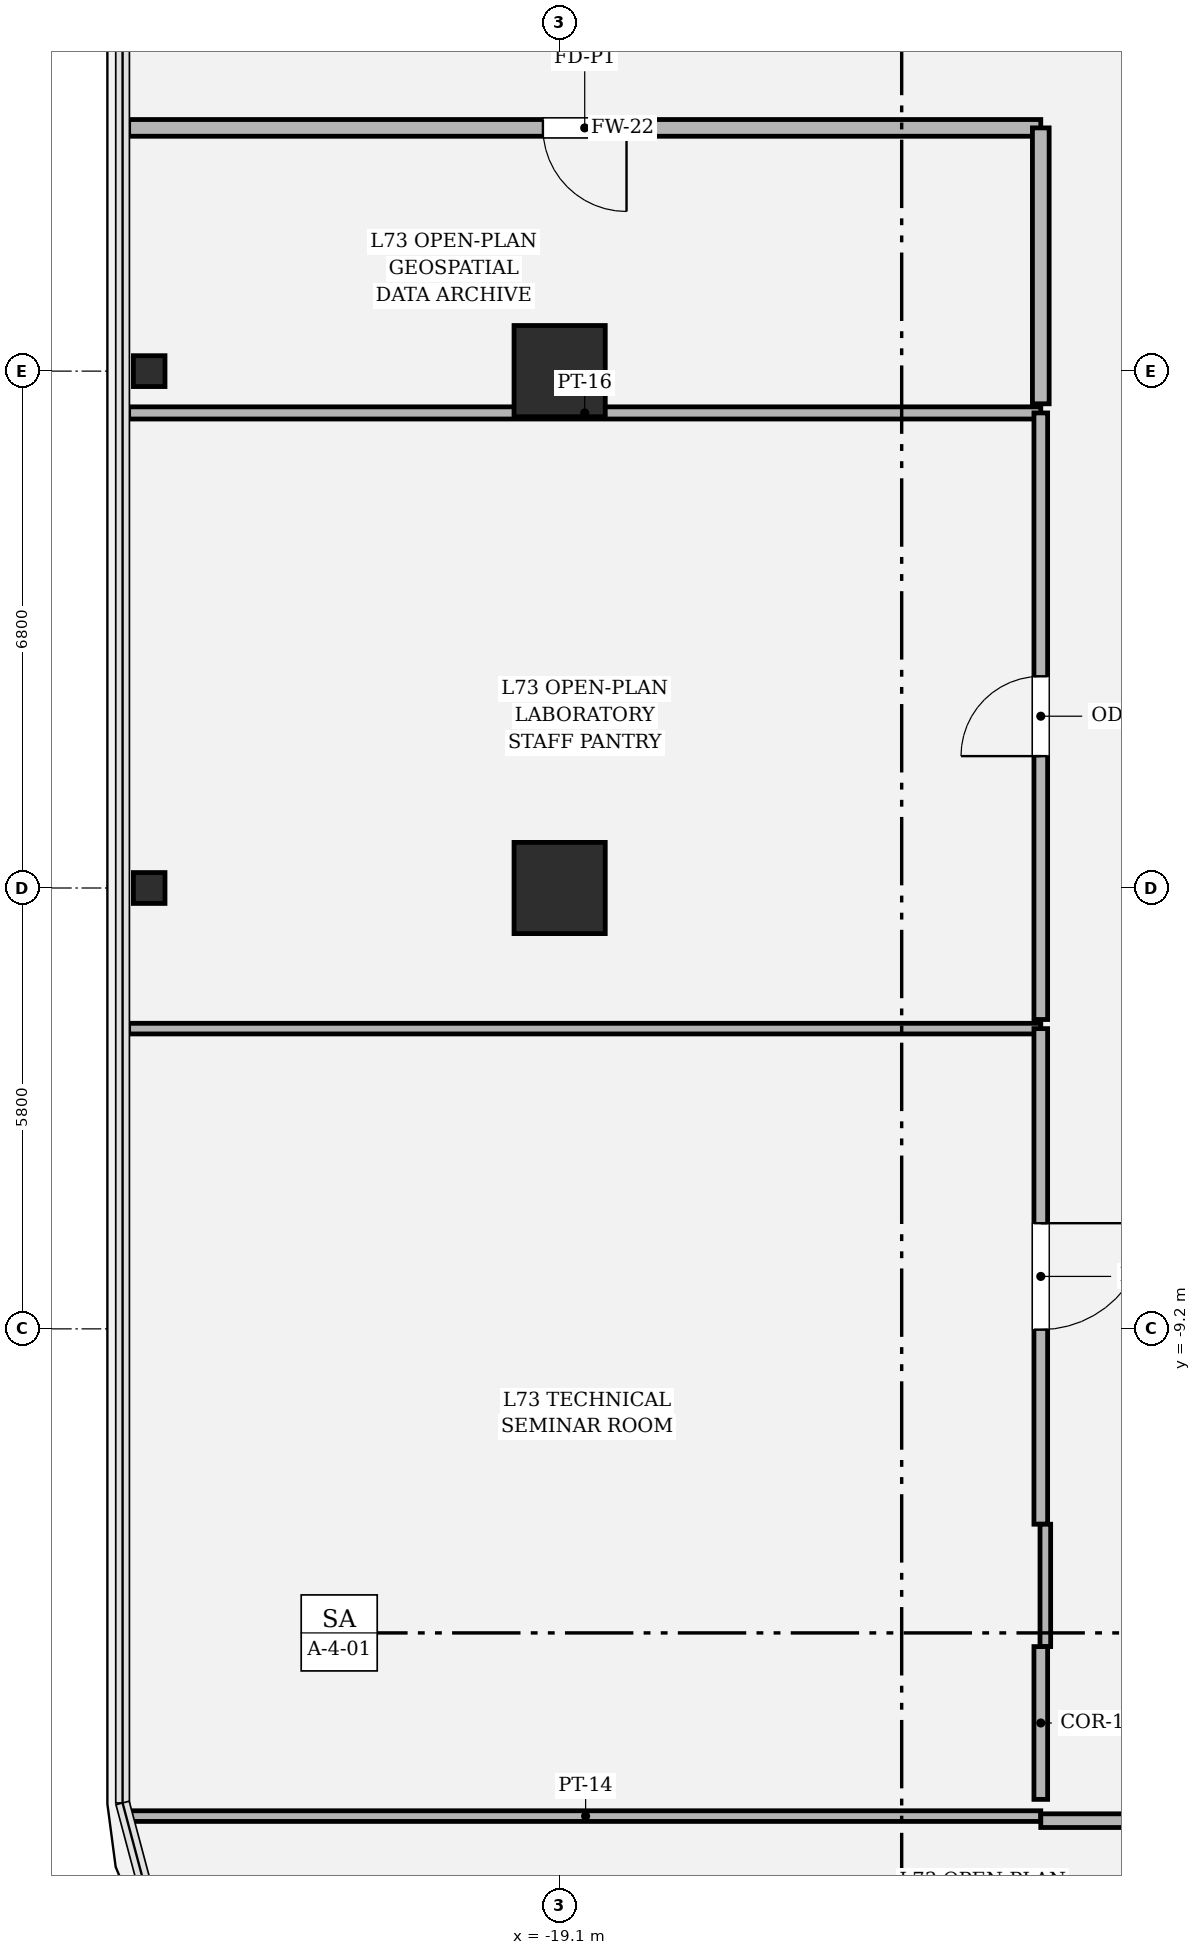
"""IFC4 building model, lengths in metres.
Left out: names, types, materials, properties, quantities, classifications, styles, units other than length and angle.
Written with IfcOpenShell. Run it as: python <this file> out.ifc"""

import sys

from ifc_helpers import new_model, si_unit, direction, frame, frame_2d, origin, origin_2d, place, context, subcontext, project, spatial, rectangle, hollow_rectangle, i_section, extrude, element, fill, save


model = new_model("IFC4")
c1 = context("Model", 3, precision=1e-05, world=origin(), true_north=direction((0.0, 1.0)))
c2 = subcontext(c1, "Body", "Model", "MODEL_VIEW")
j1 = project(units=[si_unit("LENGTHUNIT", "METRE"), si_unit("PLANEANGLEUNIT", "RADIAN")], contexts=[c1])
p1 = place(None, origin())
s1 = spatial("IfcSite", under=j1, at=p1, CompositionType="ELEMENT")
p2 = place(p1, origin())
s2 = spatial("IfcBuilding", under=s1, at=p2, CompositionType="ELEMENT")
p3 = place(p2, frame((0.0, 0.0, 309.0)))
s3 = spatial("IfcBuildingStorey", under=s2, at=p3, CompositionType="ELEMENT", Elevation=309.0)
for number, where, z_axis, x_axis in (
    (1, (-19.1, 3.4, 0.0), (0.0, 0.0, 1.0), (1.0, 0.0, 0.0)),
    (2, (-19.1, -3.4, 0.0), (0.0, 0.0, 1.0), (1.0, 0.0, 0.0)),
):
    element("IfcColumn", number, at=place(p3, frame(where, z_axis=z_axis, x_axis=x_axis)), inside=s3, PredefinedType="COLUMN", context=c2, shape_type="SweptSolid", body=[
        extrude(hollow_rectangle(XDim=1.2, YDim=1.2, WallThickness=0.035, at=origin_2d()), origin(), (0.0, 0.0, 1.0), 4.2),
    ])
for number, where, z_axis, x_axis in (
    (3, (-24.5, -3.4, 0.0), (0.0, 0.0, 1.0), (0.0, 1.0, 0.0)),
    (4, (-24.5, 3.4, 0.0), (0.0, 0.0, 1.0), (0.0, 1.0, 0.0)),
):
    element("IfcColumn", number, at=place(p3, frame(where, z_axis=z_axis, x_axis=x_axis)), inside=s3, PredefinedType="COLUMN", context=c2, shape_type="SweptSolid", body=[
        extrude(i_section(OverallWidth=0.406, OverallDepth=0.416, WebThickness=0.029, FlangeThickness=0.048, FilletRadius=0.018, at=origin_2d()), origin(), (0.0, 0.0, 1.0), 4.198),
    ])
p4 = place(p3, frame((-24.747, -15.61, 0.0), z_axis=(0.0, 0.0, 1.0), x_axis=(1.0, 0.0, 0.0)))
e5 = element("IfcWall", 5, at=p4, inside=s3, PredefinedType="PARTITIONING", context=c2, shape_type="SweptSolid", body=[
    extrude(rectangle(XDim=11.977, YDim=0.14, at=frame_2d((5.988, 0.0))), origin(), (0.0, 0.0, 1.0), 2.714),
])
p5 = place(p3, frame((-12.77, -15.67, 0.0), z_axis=(0.0, 0.0, 1.0), x_axis=(1.0, 0.0, 0.0)))
e6 = element("IfcWall", 6, at=p5, inside=s3, PredefinedType="PARTITIONING", context=c2, shape_type="SweptSolid", body=[
    extrude(rectangle(XDim=10.31, YDim=0.18, at=frame_2d((5.155, 0.0))), origin(), (0.0, 0.0, 1.0), 3.394),
])
p6 = place(p5, frame((4.63, 0.0, 0.0)))
e7 = element("IfcOpeningElement", 7, at=p6, cuts=e6, PredefinedType="OPENING", context=c2, shape_type="SweptSolid", body=[
    extrude(rectangle(XDim=1.05, YDim=2.2, at=frame_2d((0.525, 1.1))), frame((0.0, 0.1, 0.0), z_axis=(0.0, -1.0, 0.0), x_axis=(1.0, 0.0, 0.0)), (0.0, 0.0, 1.0), 0.2),
])
p7 = place(p3, frame((-24.77, -5.25, 0.0), z_axis=(0.0, 0.0, 1.0), x_axis=(1.0, 0.0, 0.0)))
e8 = element("IfcWall", 8, at=p7, inside=s3, PredefinedType="PARTITIONING", context=c2, shape_type="SweptSolid", body=[
    extrude(rectangle(XDim=12.0, YDim=0.14, at=frame_2d((6.0, 0.0))), origin(), (0.0, 0.0, 1.0), 2.714),
])
p8 = place(p3, frame((-12.77, -5.25, 0.0), z_axis=(0.0, 0.0, 1.0), x_axis=(0.0, -1.0, 0.0)))
e9 = element("IfcWall", 9, at=p8, inside=s3, PredefinedType="PARTITIONING", context=c2, shape_type="SweptSolid", body=[
    extrude(rectangle(XDim=6.52, YDim=0.18, at=frame_2d((3.26, 0.0))), origin(), (0.0, 0.0, 1.0), 3.394),
])
p9 = place(p8, frame((2.56, 0.0, 0.0)))
e10 = element("IfcOpeningElement", 10, at=p9, cuts=e9, PredefinedType="OPENING", context=c2, shape_type="SweptSolid", body=[
    extrude(rectangle(XDim=1.4, YDim=2.25, at=frame_2d((0.7, 1.125))), frame((0.0, 0.1, 0.0), z_axis=(0.0, -1.0, 0.0), x_axis=(1.0, 0.0, 0.0)), (0.0, 0.0, 1.0), 0.2),
])
p10 = place(p3, frame((-12.71, -11.77, 0.0), z_axis=(0.0, 0.0, 1.0), x_axis=(0.0, -1.0, 0.0)))
e11 = element("IfcWall", 11, at=p10, inside=s3, PredefinedType="PARTITIONING", context=c2, shape_type="SweptSolid", body=[
    extrude(rectangle(XDim=1.61, YDim=0.14, at=frame_2d((0.805, 0.0))), origin(), (0.0, 0.0, 1.0), 3.634),
])
p11 = place(p3, frame((-12.77, -13.38, 0.0), z_axis=(0.0, 0.0, 1.0), x_axis=(0.0, -1.0, 0.0)))
e12 = element("IfcWall", 12, at=p11, inside=s3, PredefinedType="PARTITIONING", context=c2, shape_type="SweptSolid", body=[
    extrude(rectangle(XDim=2.01, YDim=0.18, at=frame_2d((1.005, 0.0))), origin(), (0.0, 0.0, 1.0), 3.634),
])
p12 = place(p3, frame((-24.77, 2.85, 0.0), z_axis=(0.0, 0.0, 1.0), x_axis=(1.0, 0.0, 0.0)))
e13 = element("IfcWall", 13, at=p12, inside=s3, PredefinedType="PARTITIONING", context=c2, shape_type="SweptSolid", body=[
    extrude(rectangle(XDim=12.0, YDim=0.16, at=frame_2d((6.0, 0.0))), origin(), (0.0, 0.0, 1.0), 2.714),
])
p13 = place(p3, frame((-12.77, 2.85, 0.0), z_axis=(0.0, 0.0, 1.0), x_axis=(0.0, -1.0, 0.0)))
e14 = element("IfcWall", 14, at=p13, inside=s3, PredefinedType="PARTITIONING", context=c2, shape_type="SweptSolid", body=[
    extrude(rectangle(XDim=7.98, YDim=0.18, at=frame_2d((3.99, 0.0))), origin(), (0.0, 0.0, 1.0), 3.394),
])
p14 = place(p13, frame((3.465, 0.0, 0.0)))
e15 = element("IfcOpeningElement", 15, at=p14, cuts=e14, PredefinedType="OPENING", context=c2, shape_type="SweptSolid", body=[
    extrude(rectangle(XDim=1.05, YDim=2.2, at=frame_2d((0.525, 1.1))), frame((0.0, 0.1, 0.0), z_axis=(0.0, -1.0, 0.0), x_axis=(1.0, 0.0, 0.0)), (0.0, 0.0, 1.0), 0.2),
])
p15 = place(p3, frame((-24.77, 6.6, 0.0), z_axis=(0.0, 0.0, 1.0), x_axis=(1.0, 0.0, 0.0)))
e16 = element("IfcWall", 16, at=p15, inside=s3, PredefinedType="SOLIDWALL", context=c2, shape_type="SweptSolid", body=[
    extrude(rectangle(XDim=12.0, YDim=0.22, at=frame_2d((6.0, 0.0))), origin(), (0.0, 0.0, 1.0), 2.714),
])
p16 = place(p15, frame((5.45, 0.0, 0.0)))
e17 = element("IfcOpeningElement", 17, at=p16, cuts=e16, PredefinedType="OPENING", context=c2, shape_type="SweptSolid", body=[
    extrude(rectangle(XDim=1.1, YDim=2.2, at=frame_2d((0.55, 1.1))), frame((0.0, 0.12, 0.0), z_axis=(0.0, -1.0, 0.0), x_axis=(1.0, 0.0, 0.0)), (0.0, 0.0, 1.0), 0.24),
])
p17 = place(p3, frame((-12.77, 6.6, 0.0), z_axis=(0.0, 0.0, 1.0), x_axis=(0.0, -1.0, 0.0)))
e18 = element("IfcWall", 18, at=p17, inside=s3, PredefinedType="SOLIDWALL", context=c2, shape_type="SweptSolid", body=[
    extrude(rectangle(XDim=3.63, YDim=0.22, at=frame_2d((1.815, 0.0))), origin(), (0.0, 0.0, 1.0), 3.394),
])
p18 = place(p9, origin())
e19 = element("IfcDoor", 19, at=p18, inside=s3, OperationType="SINGLE_SWING_LEFT", PredefinedType="DOOR", context=c2, shape_type="SweptSolid", body=[
    extrude(rectangle(XDim=1.4, YDim=2.25, at=frame_2d((0.7, 1.125))), frame((0.0, 0.025, 0.0), z_axis=(0.0, -1.0, 0.0), x_axis=(1.0, 0.0, 0.0)), (0.0, 0.0, 1.0), 0.05),
])
fill(e10, e19)
p19 = place(p14, origin())
e20 = element("IfcDoor", 20, at=p19, inside=s3, OperationType="SINGLE_SWING_RIGHT", PredefinedType="DOOR", context=c2, shape_type="SweptSolid", body=[
    extrude(rectangle(XDim=1.05, YDim=2.2, at=frame_2d((0.525, 1.1))), frame((0.0, 0.025, 0.0), z_axis=(0.0, -1.0, 0.0), x_axis=(1.0, 0.0, 0.0)), (0.0, 0.0, 1.0), 0.05),
])
fill(e15, e20)
p20 = place(p16, origin())
e21 = element("IfcDoor", 21, at=p20, inside=s3, OperationType="SINGLE_SWING_RIGHT", PredefinedType="DOOR", context=c2, shape_type="SweptSolid", body=[
    extrude(rectangle(XDim=1.1, YDim=2.2, at=frame_2d((0.55, 1.1))), frame((0.0, 0.025, 0.0), z_axis=(0.0, -1.0, 0.0), x_axis=(1.0, 0.0, 0.0)), (0.0, 0.0, 1.0), 0.05),
])
fill(e17, e21)
save(model, sys.argv[1])
